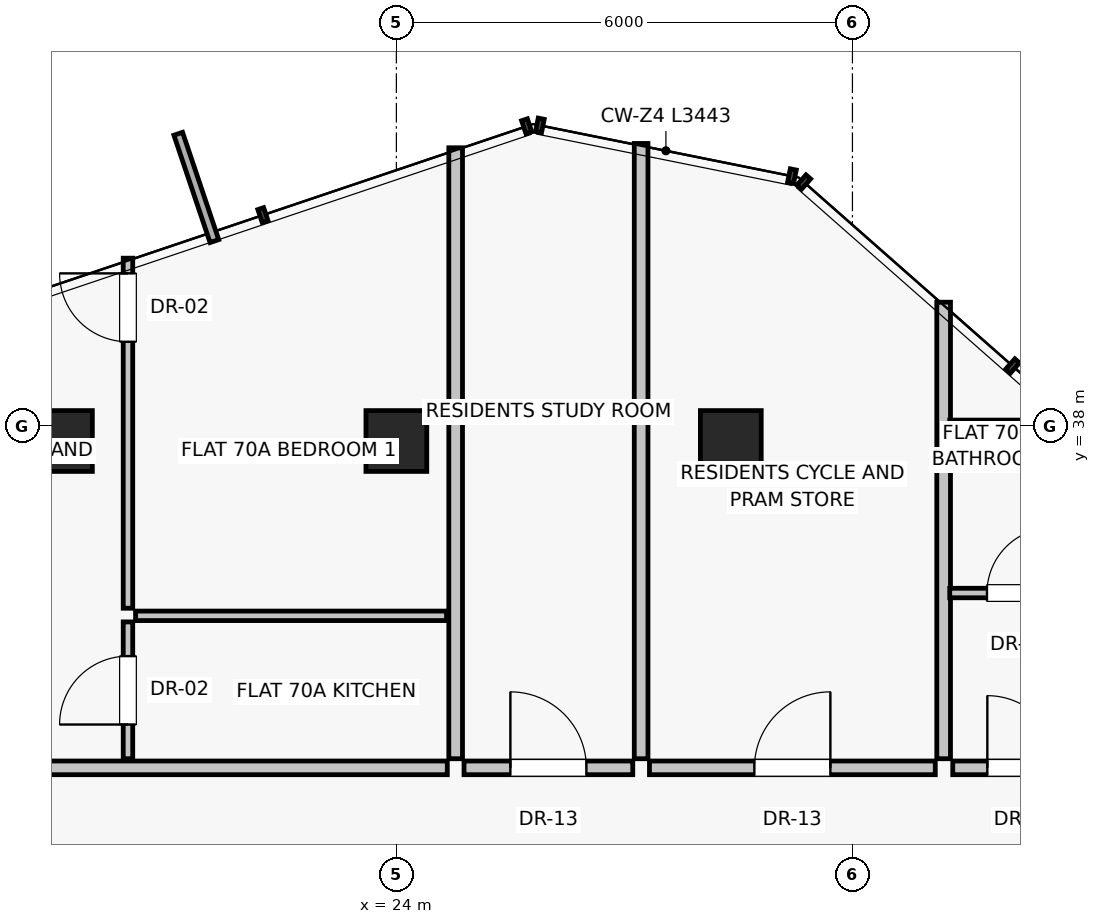
"""IFC4 building model, lengths in metres.
Left out: names, types, materials, properties, quantities, classifications, styles, units other than length and angle.
Written with IfcOpenShell. Run it as: python <this file> out.ifc"""

import sys

from ifc_helpers import new_model, si_unit, direction, frame, frame_2d, origin, origin_2d, place, context, subcontext, project, spatial, rectangle, extrude, source, transform, mapped, element, fill, save


model = new_model("IFC4")
c1 = context("Model", 3, precision=1e-05, world=origin(), true_north=direction((0.0, 1.0)))
c2 = subcontext(c1, "Body", "Model", "MODEL_VIEW")
j1 = project(units=[si_unit("LENGTHUNIT", "METRE"), si_unit("PLANEANGLEUNIT", "RADIAN")], contexts=[c1])
p1 = place(None, origin())
s1 = spatial("IfcSite", under=j1, at=p1, CompositionType="ELEMENT")
p2 = place(p1, origin())
s2 = spatial("IfcBuilding", under=s1, at=p2, CompositionType="ELEMENT")
p3 = place(p2, frame((0.0, 0.0, 248.0)))
s3 = spatial("IfcBuildingStorey", under=s2, at=p3, CompositionType="ELEMENT", Elevation=248.0)
for number, where, z_axis, x_axis in (
    (1, (28.4, 37.8, 0.0), (0.0, 0.0, 1.0), (1.0, 0.0, 0.0)),
    (2, (24.0, 37.8, 0.0), (0.0, 0.0, 1.0), (1.0, 0.0, 0.0)),
    (3, (19.6, 37.8, 0.0), (0.0, 0.0, 1.0), (1.0, 0.0, 0.0)),
):
    element("IfcColumn", number, at=place(p3, frame(where, z_axis=z_axis, x_axis=x_axis)), inside=s3, PredefinedType="COLUMN", context=c2, shape_type="SweptSolid", body=[
        extrude(rectangle(XDim=0.8, YDim=0.8, at=origin_2d()), origin(), (0.0, 0.0, 1.0), 3.25),
    ])
p4 = place(p3, frame((31.2, 33.62, 0.0), z_axis=(0.0, 0.0, 1.0), x_axis=(0.0, 1.0, 0.0)))
e4 = element("IfcWall", 4, at=p4, inside=s3, PredefinedType="PARTITIONING", context=c2, shape_type="SweptSolid", body=[
    extrude(rectangle(XDim=6.006, YDim=0.18, at=frame_2d((3.003, 0.0))), origin(), (0.0, 0.0, 1.0), 3.015),
])
p5 = place(p3, frame((15.31, 33.5, 0.0), z_axis=(0.0, 0.0, 1.0), x_axis=(1.0, 0.0, 0.0)))
e5 = element("IfcWall", 5, at=p5, inside=s3, PredefinedType="PARTITIONING", context=c2, shape_type="SweptSolid", body=[
    extrude(rectangle(XDim=9.36, YDim=0.18, at=frame_2d((4.68, 0.0))), origin(), (0.0, 0.0, 1.0), 3.015),
])
p6 = place(p5, frame((3.175, 0.0, 0.0)))
e6 = element("IfcOpeningElement", 6, at=p6, cuts=e5, PredefinedType="OPENING", context=c2, shape_type="SweptSolid", body=[
    extrude(rectangle(XDim=0.95, YDim=2.02, at=frame_2d((0.475, 1.01))), frame((0.0, 0.1, 0.0), z_axis=(0.0, -1.0, 0.0), x_axis=(1.0, 0.0, 0.0)), (0.0, 0.0, 1.0), 0.2),
])
p7 = place(p3, frame((20.469, 33.62, 0.0), z_axis=(0.0, 0.0, 1.0), x_axis=(0.0, 1.0, 0.0)))
e7 = element("IfcWall", 7, at=p7, inside=s3, PredefinedType="PARTITIONING", context=c2, shape_type="SweptSolid", body=[
    extrude(rectangle(XDim=1.8, YDim=0.125, at=frame_2d((0.9, 0.0))), origin(), (0.0, 0.0, 1.0), 2.543),
])
p8 = place(p7, frame((0.45, 0.0, 0.0)))
e8 = element("IfcOpeningElement", 8, at=p8, cuts=e7, PredefinedType="OPENING", context=c2, shape_type="SweptSolid", body=[
    extrude(rectangle(XDim=0.9, YDim=2.01, at=frame_2d((0.45, 1.005))), frame((0.0, 0.073, 0.0), z_axis=(0.0, -1.0, 0.0), x_axis=(1.0, 0.0, 0.0)), (0.0, 0.0, 1.0), 0.145),
])
p9 = place(p3, frame((20.569, 35.5, 0.0), z_axis=(0.0, 0.0, 1.0), x_axis=(1.0, 0.0, 0.0)))
e9 = element("IfcWall", 9, at=p9, inside=s3, PredefinedType="PARTITIONING", context=c2, shape_type="SweptSolid", body=[
    extrude(rectangle(XDim=4.091, YDim=0.125, at=frame_2d((2.045, 0.0))), origin(), (0.0, 0.0, 1.0), 3.015),
])
p10 = place(p3, frame((20.469, 35.6, 0.0), z_axis=(0.0, 0.0, 1.0), x_axis=(0.0, 1.0, 0.0)))
e10 = element("IfcWall", 10, at=p10, inside=s3, PredefinedType="PARTITIONING", context=c2, shape_type="SweptSolid", body=[
    extrude(rectangle(XDim=4.605, YDim=0.125, at=frame_2d((2.303, 0.0))), origin(), (0.0, 0.0, 1.0), 2.543),
])
p11 = place(p10, frame((3.505, 0.0, 0.0)))
e11 = element("IfcOpeningElement", 11, at=p11, cuts=e10, PredefinedType="OPENING", context=c2, shape_type="SweptSolid", body=[
    extrude(rectangle(XDim=0.9, YDim=2.01, at=frame_2d((0.45, 1.005))), frame((0.0, 0.073, 0.0), z_axis=(0.0, -1.0, 0.0), x_axis=(1.0, 0.0, 0.0)), (0.0, 0.0, 1.0), 0.145),
])
p12 = place(p3, frame((24.78, 33.62, 0.0), z_axis=(0.0, 0.0, 1.0), x_axis=(0.0, 1.0, 0.0)))
e12 = element("IfcWall", 12, at=p12, inside=s3, PredefinedType="PARTITIONING", context=c2, shape_type="SweptSolid", body=[
    extrude(rectangle(XDim=8.038, YDim=0.18, at=frame_2d((4.019, 0.0))), origin(), (0.0, 0.0, 1.0), 3.015),
])
p13 = place(p3, frame((24.89, 33.5, 0.0), z_axis=(0.0, 0.0, 1.0), x_axis=(1.0, 0.0, 0.0)))
e13 = element("IfcWall", 13, at=p13, inside=s3, PredefinedType="PARTITIONING", context=c2, shape_type="SweptSolid", body=[
    extrude(rectangle(XDim=2.22, YDim=0.18, at=frame_2d((1.11, 0.0))), origin(), (0.0, 0.0, 1.0), 3.015),
])
p14 = place(p13, frame((0.61, 0.0, 0.0)))
e14 = element("IfcOpeningElement", 14, at=p14, cuts=e13, PredefinedType="OPENING", context=c2, shape_type="SweptSolid", body=[
    extrude(rectangle(XDim=1.0, YDim=2.01, at=frame_2d((0.5, 1.005))), frame((0.0, 0.1, 0.0), z_axis=(0.0, -1.0, 0.0), x_axis=(1.0, 0.0, 0.0)), (0.0, 0.0, 1.0), 0.2),
])
p15 = place(p3, frame((27.33, 33.5, 0.0), z_axis=(0.0, 0.0, 1.0), x_axis=(1.0, 0.0, 0.0)))
e15 = element("IfcWall", 15, at=p15, inside=s3, PredefinedType="PARTITIONING", context=c2, shape_type="SweptSolid", body=[
    extrude(rectangle(XDim=3.76, YDim=0.18, at=frame_2d((1.88, 0.0))), origin(), (0.0, 0.0, 1.0), 3.015),
])
p16 = place(p15, frame((1.38, 0.0, 0.0)))
e16 = element("IfcOpeningElement", 16, at=p16, cuts=e15, PredefinedType="OPENING", context=c2, shape_type="SweptSolid", body=[
    extrude(rectangle(XDim=1.0, YDim=2.01, at=frame_2d((0.5, 1.005))), frame((0.0, 0.1, 0.0), z_axis=(0.0, -1.0, 0.0), x_axis=(1.0, 0.0, 0.0)), (0.0, 0.0, 1.0), 0.2),
])
p17 = place(p3, frame((27.22, 33.62, 0.0), z_axis=(0.0, 0.0, 1.0), x_axis=(0.0, 1.0, 0.0)))
e17 = element("IfcWall", 17, at=p17, inside=s3, PredefinedType="PARTITIONING", context=c2, shape_type="SweptSolid", body=[
    extrude(rectangle(XDim=8.094, YDim=0.18, at=frame_2d((4.047, 0.0))), origin(), (0.0, 0.0, 1.0), 3.015),
])
p18 = place(p3, frame((31.32, 33.5, 0.0), z_axis=(0.0, 0.0, 1.0), x_axis=(1.0, 0.0, 0.0)))
e18 = element("IfcWall", 18, at=p18, inside=s3, PredefinedType="PARTITIONING", context=c2, shape_type="SweptSolid", body=[
    extrude(rectangle(XDim=1.86, YDim=0.18, at=frame_2d((0.93, 0.0))), origin(), (0.0, 0.0, 1.0), 3.015),
])
p19 = place(p18, frame((0.455, 0.0, 0.0)))
e19 = element("IfcOpeningElement", 19, at=p19, cuts=e18, PredefinedType="OPENING", context=c2, shape_type="SweptSolid", body=[
    extrude(rectangle(XDim=0.95, YDim=2.02, at=frame_2d((0.475, 1.01))), frame((0.0, 0.1, 0.0), z_axis=(0.0, -1.0, 0.0), x_axis=(1.0, 0.0, 0.0)), (0.0, 0.0, 1.0), 0.2),
])
p20 = place(p3, frame((31.28, 35.8, 0.0), z_axis=(0.0, 0.0, 1.0), x_axis=(1.0, 0.0, 0.0)))
e20 = element("IfcWall", 20, at=p20, inside=s3, PredefinedType="PARTITIONING", context=c2, shape_type="SweptSolid", body=[
    extrude(rectangle(XDim=1.84, YDim=0.125, at=frame_2d((0.92, 0.0))), origin(), (0.0, 0.0, 1.0), 3.015),
])
p21 = place(p20, frame((0.49, 0.0, 0.0)))
e21 = element("IfcOpeningElement", 21, at=p21, cuts=e20, PredefinedType="OPENING", context=c2, shape_type="SweptSolid", body=[
    extrude(rectangle(XDim=0.86, YDim=2.01, at=frame_2d((0.43, 1.005))), frame((0.0, 0.073, 0.0), z_axis=(0.0, -1.0, 0.0), x_axis=(1.0, 0.0, 0.0)), (0.0, 0.0, 1.0), 0.145),
])
p22 = place(p3, frame((31.28, 38.0, 0.0), z_axis=(0.0, 0.0, 1.0), x_axis=(1.0, 0.0, 0.0)))
e22 = element("IfcWall", 22, at=p22, inside=s3, PredefinedType="PARTITIONING", context=c2, shape_type="SweptSolid", body=[
    extrude(rectangle(XDim=1.766, YDim=0.15, at=frame_2d((0.883, 0.0))), origin(), (0.0, 0.0, 1.0), 3.015),
])
m1 = source(origin(), c2, "Body", "SweptSolid", [
    extrude(rectangle(XDim=0.9, YDim=2.01, at=frame_2d((0.45, 1.005))), frame((0.0, 0.025, 0.0), z_axis=(0.0, -1.0, 0.0), x_axis=(1.0, 0.0, 0.0)), (0.0, 0.0, 1.0), 0.05),
])
p23 = place(p8, origin())
e23 = element("IfcDoor", 23, at=p23, inside=s3, OperationType="SINGLE_SWING_LEFT", PredefinedType="DOOR", context=c2, shape_type="MappedRepresentation", body=[
    mapped(m1, transform((0.0, 0.0, 0.0), scale=1.0)),
])
fill(e8, e23)
p24 = place(p11, origin())
e24 = element("IfcDoor", 24, at=p24, inside=s3, OperationType="SINGLE_SWING_RIGHT", PredefinedType="DOOR", context=c2, shape_type="MappedRepresentation", body=[
    mapped(m1, transform((0.0, 0.0, 0.0), scale=1.0)),
])
fill(e11, e24)
m2 = source(origin(), c2, "Body", "SweptSolid", [
    extrude(rectangle(XDim=1.0, YDim=2.01, at=frame_2d((0.5, 1.005))), frame((0.0, 0.025, 0.0), z_axis=(0.0, -1.0, 0.0), x_axis=(1.0, 0.0, 0.0)), (0.0, 0.0, 1.0), 0.05),
])
p25 = place(p14, origin())
e25 = element("IfcDoor", 25, at=p25, inside=s3, OperationType="SINGLE_SWING_LEFT", PredefinedType="DOOR", context=c2, shape_type="MappedRepresentation", body=[
    mapped(m2, transform((0.0, 0.0, 0.0), scale=1.0)),
])
fill(e14, e25)
p26 = place(p16, origin())
e26 = element("IfcDoor", 26, at=p26, inside=s3, OperationType="SINGLE_SWING_RIGHT", PredefinedType="DOOR", context=c2, shape_type="MappedRepresentation", body=[
    mapped(m2, transform((0.0, 0.0, 0.0), scale=1.0)),
])
fill(e16, e26)
m3 = source(origin(), c2, "Body", "SweptSolid", [
    extrude(rectangle(XDim=0.95, YDim=2.02, at=frame_2d((0.475, 1.01))), frame((0.0, 0.025, 0.0), z_axis=(0.0, -1.0, 0.0), x_axis=(1.0, 0.0, 0.0)), (0.0, 0.0, 1.0), 0.05),
])
p27 = place(p19, origin())
e27 = element("IfcDoor", 27, at=p27, inside=s3, OperationType="SINGLE_SWING_LEFT", PredefinedType="DOOR", context=c2, shape_type="MappedRepresentation", body=[
    mapped(m3, transform((0.0, 0.0, 0.0), scale=1.0)),
])
fill(e19, e27)
m4 = source(origin(), c2, "Body", "SweptSolid", [
    extrude(rectangle(XDim=0.86, YDim=2.01, at=frame_2d((0.43, 1.005))), frame((0.0, 0.025, 0.0), z_axis=(0.0, -1.0, 0.0), x_axis=(1.0, 0.0, 0.0)), (0.0, 0.0, 1.0), 0.05),
])
p28 = place(p21, origin())
e28 = element("IfcDoor", 28, at=p28, inside=s3, OperationType="SINGLE_SWING_RIGHT", PredefinedType="DOOR", context=c2, shape_type="MappedRepresentation", body=[
    mapped(m4, transform((0.0, 0.0, 0.0), scale=1.0)),
])
fill(e21, e28)
save(model, sys.argv[1])
